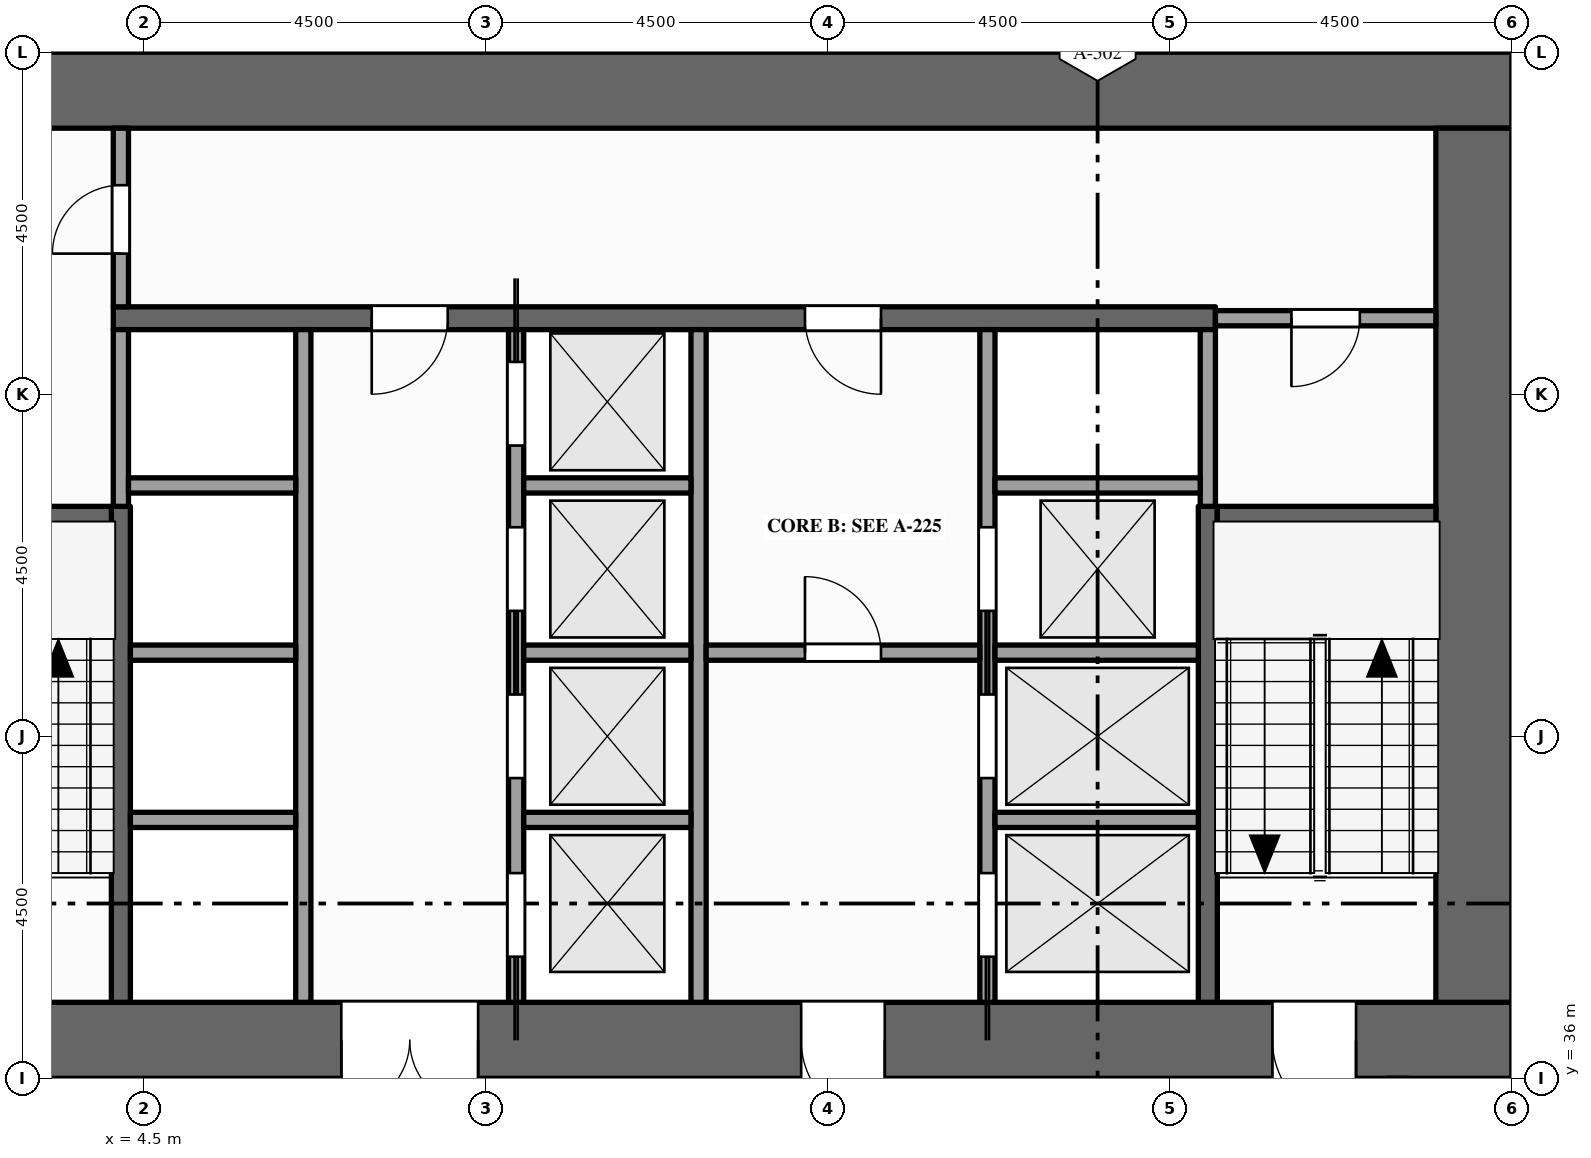
"""IFC4 building model, lengths in metres.
Left out: names, types, materials, properties, quantities, classifications, styles, units other than length and angle.
Written with IfcOpenShell. Run it as: python <this file> out.ifc"""

import sys

from ifc_helpers import new_model, si_unit, direction, frame, frame_2d, origin, place, context, subcontext, project, spatial, rectangle, extrude, element, fill, save


model = new_model("IFC4")
c1 = context("Model", 3, precision=1e-05, world=origin(), true_north=direction((0.0, 1.0)))
c2 = subcontext(c1, "Body", "Model", "MODEL_VIEW")
j1 = project(units=[si_unit("LENGTHUNIT", "METRE"), si_unit("PLANEANGLEUNIT", "RADIAN")], contexts=[c1])
p1 = place(None, origin())
s1 = spatial("IfcSite", under=j1, at=p1, CompositionType="ELEMENT")
p2 = place(p1, origin())
s2 = spatial("IfcBuilding", under=s1, at=p2, CompositionType="ELEMENT")
p3 = place(p2, frame((0.0, 0.0, 139.0)))
s3 = spatial("IfcBuildingStorey", under=s2, at=p3, CompositionType="ELEMENT", Elevation=139.0)
p4 = place(p3, frame((0.0, 36.5, -0.15), z_axis=(0.0, 0.0, 1.0), x_axis=(1.0, 0.0, 0.0)))
e1 = element("IfcWall", 1, at=p4, inside=s3, PredefinedType="SHEAR", context=c2, shape_type="SweptSolid", body=[
    extrude(rectangle(XDim=22.5, YDim=1.0, at=frame_2d((11.25, 0.0))), origin(), (0.0, 0.0, 1.0), 4.0),
])
p5 = place(p4, frame((7.1, 0.0, 0.15)))
e2 = element("IfcOpeningElement", 2, at=p5, cuts=e1, PredefinedType="OPENING", context=c2, shape_type="SweptSolid", body=[
    extrude(rectangle(XDim=1.8, YDim=2.1, at=frame_2d((0.9, 1.05))), frame((0.0, 0.51, 0.0), z_axis=(0.0, -1.0, 0.0), x_axis=(1.0, 0.0, 0.0)), (0.0, 0.0, 1.0), 1.02),
])
p6 = place(p4, frame((13.15, 0.0, 0.15)))
e3 = element("IfcOpeningElement", 3, at=p6, cuts=e1, PredefinedType="OPENING", context=c2, shape_type="SweptSolid", body=[
    extrude(rectangle(XDim=1.1, YDim=2.1, at=frame_2d((0.55, 1.05))), frame((0.0, 0.51, 0.0), z_axis=(0.0, -1.0, 0.0), x_axis=(1.0, 0.0, 0.0)), (0.0, 0.0, 1.0), 1.02),
])
p7 = place(p4, frame((2.15, 0.0, 0.15)))
e4 = element("IfcOpeningElement", 4, at=p7, cuts=e1, PredefinedType="OPENING", context=c2, shape_type="SweptSolid", body=[
    extrude(rectangle(XDim=1.1, YDim=2.1, at=frame_2d((0.55, 1.05))), frame((0.0, 0.51, 0.0), z_axis=(0.0, -1.0, 0.0), x_axis=(1.0, 0.0, 0.0)), (0.0, 0.0, 1.0), 1.02),
])
p8 = place(p4, frame((19.35, 0.0, 0.15)))
e5 = element("IfcOpeningElement", 5, at=p8, cuts=e1, PredefinedType="OPENING", context=c2, shape_type="SweptSolid", body=[
    extrude(rectangle(XDim=1.1, YDim=2.1, at=frame_2d((0.55, 1.05))), frame((0.0, 0.51, 0.0), z_axis=(0.0, -1.0, 0.0), x_axis=(1.0, 0.0, 0.0)), (0.0, 0.0, 1.0), 1.02),
])
p9 = place(p3, frame((0.0, 49.0, -0.15), z_axis=(0.0, 0.0, 1.0), x_axis=(1.0, 0.0, 0.0)))
e6 = element("IfcWall", 6, at=p9, inside=s3, PredefinedType="SHEAR", context=c2, shape_type="SweptSolid", body=[
    extrude(rectangle(XDim=22.5, YDim=1.0, at=frame_2d((11.25, 0.0))), origin(), (0.0, 0.0, 1.0), 4.0),
])
p10 = place(p3, frame((22.0, 37.0, -0.15), z_axis=(0.0, 0.0, 1.0), x_axis=(0.0, 1.0, 0.0)))
e7 = element("IfcWall", 7, at=p10, inside=s3, PredefinedType="SHEAR", context=c2, shape_type="SweptSolid", body=[
    extrude(rectangle(XDim=11.5, YDim=1.0, at=frame_2d((5.75, 0.0))), origin(), (0.0, 0.0, 1.0), 4.0),
])
p11 = place(p3, frame((4.2, 37.0, 0.0), z_axis=(0.0, 0.0, 1.0), x_axis=(0.0, 1.0, 0.0)))
e8 = element("IfcWall", 8, at=p11, inside=s3, PredefinedType="SHEAR", context=c2, shape_type="SweptSolid", body=[
    extrude(rectangle(XDim=6.525, YDim=0.25, at=frame_2d((3.262, 0.0))), origin(), (0.0, 0.0, 1.0), 3.85),
])
p12 = place(p3, frame((4.2, 43.525, 0.0), z_axis=(0.0, 0.0, 1.0), x_axis=(0.0, 1.0, 0.0)))
e9 = element("IfcWall", 9, at=p12, inside=s3, PredefinedType="SOLIDWALL", context=c2, shape_type="SweptSolid", body=[
    extrude(rectangle(XDim=2.325, YDim=0.2, at=frame_2d((1.163, 0.0))), origin(), (0.0, 0.0, 1.0), 3.85),
])
p13 = place(p3, frame((4.2, 46.15, 0.0), z_axis=(0.0, 0.0, 1.0), x_axis=(0.0, 1.0, 0.0)))
e10 = element("IfcWall", 10, at=p13, inside=s3, PredefinedType="PARTITIONING", context=c2, shape_type="SweptSolid", body=[
    extrude(rectangle(XDim=2.35, YDim=0.2, at=frame_2d((1.175, 0.0))), origin(), (0.0, 0.0, 1.0), 3.85),
])
p14 = place(p13, frame((0.7, 0.0, 0.0)))
e11 = element("IfcOpeningElement", 11, at=p14, cuts=e10, PredefinedType="OPENING", context=c2, shape_type="SweptSolid", body=[
    extrude(rectangle(XDim=0.9, YDim=2.1, at=frame_2d((0.45, 1.05))), frame((0.0, 0.11, 0.0), z_axis=(0.0, -1.0, 0.0), x_axis=(1.0, 0.0, 0.0)), (0.0, 0.0, 1.0), 0.22),
])
p15 = place(p3, frame((6.6, 37.0, 0.0), z_axis=(0.0, 0.0, 1.0), x_axis=(0.0, 1.0, 0.0)))
e12 = element("IfcWall", 12, at=p15, inside=s3, PredefinedType="SOLIDWALL", context=c2, shape_type="SweptSolid", body=[
    extrude(rectangle(XDim=8.85, YDim=0.2, at=frame_2d((4.425, 0.0))), origin(), (0.0, 0.0, 1.0), 3.85),
])
p16 = place(p3, frame((9.4, 37.0, 0.0), z_axis=(0.0, 0.0, 1.0), x_axis=(0.0, 1.0, 0.0)))
e13 = element("IfcWall", 13, at=p16, inside=s3, PredefinedType="SOLIDWALL", context=c2, shape_type="SweptSolid", body=[
    extrude(rectangle(XDim=8.85, YDim=0.2, at=frame_2d((4.425, 0.0))), origin(), (0.0, 0.0, 1.0), 3.85),
])
p17 = place(p16, frame((0.6, 0.0, 0.012)))
e14 = element("IfcOpeningElement", 14, at=p17, cuts=e13, PredefinedType="OPENING", context=c2, shape_type="SweptSolid", body=[
    extrude(rectangle(XDim=1.1, YDim=2.1, at=frame_2d((0.55, 1.05))), frame((0.0, 0.11, 0.0), z_axis=(0.0, -1.0, 0.0), x_axis=(1.0, 0.0, 0.0)), (0.0, 0.0, 1.0), 0.22),
])
p18 = place(p16, frame((2.95, 0.0, 0.012)))
e15 = element("IfcOpeningElement", 15, at=p18, cuts=e13, PredefinedType="OPENING", context=c2, shape_type="SweptSolid", body=[
    extrude(rectangle(XDim=1.1, YDim=2.1, at=frame_2d((0.55, 1.05))), frame((0.0, 0.11, 0.0), z_axis=(0.0, -1.0, 0.0), x_axis=(1.0, 0.0, 0.0)), (0.0, 0.0, 1.0), 0.22),
])
p19 = place(p16, frame((5.15, 0.0, 0.012)))
e16 = element("IfcOpeningElement", 16, at=p19, cuts=e13, PredefinedType="OPENING", context=c2, shape_type="SweptSolid", body=[
    extrude(rectangle(XDim=1.1, YDim=2.1, at=frame_2d((0.55, 1.05))), frame((0.0, 0.11, 0.0), z_axis=(0.0, -1.0, 0.0), x_axis=(1.0, 0.0, 0.0)), (0.0, 0.0, 1.0), 0.22),
])
p20 = place(p16, frame((7.325, 0.0, 0.012)))
e17 = element("IfcOpeningElement", 17, at=p20, cuts=e13, PredefinedType="OPENING", context=c2, shape_type="SweptSolid", body=[
    extrude(rectangle(XDim=1.1, YDim=2.1, at=frame_2d((0.55, 1.05))), frame((0.0, 0.11, 0.0), z_axis=(0.0, -1.0, 0.0), x_axis=(1.0, 0.0, 0.0)), (0.0, 0.0, 1.0), 0.22),
])
p21 = place(p3, frame((11.8, 37.0, 0.0), z_axis=(0.0, 0.0, 1.0), x_axis=(0.0, 1.0, 0.0)))
e18 = element("IfcWall", 18, at=p21, inside=s3, PredefinedType="SOLIDWALL", context=c2, shape_type="SweptSolid", body=[
    extrude(rectangle(XDim=8.85, YDim=0.2, at=frame_2d((4.425, 0.0))), origin(), (0.0, 0.0, 1.0), 3.85),
])
p22 = place(p3, frame((15.6, 37.0, 0.0), z_axis=(0.0, 0.0, 1.0), x_axis=(0.0, 1.0, 0.0)))
e19 = element("IfcWall", 19, at=p22, inside=s3, PredefinedType="SOLIDWALL", context=c2, shape_type="SweptSolid", body=[
    extrude(rectangle(XDim=8.85, YDim=0.2, at=frame_2d((4.425, 0.0))), origin(), (0.0, 0.0, 1.0), 3.85),
])
p23 = place(p22, frame((0.6, 0.0, 0.012)))
e20 = element("IfcOpeningElement", 20, at=p23, cuts=e19, PredefinedType="OPENING", context=c2, shape_type="SweptSolid", body=[
    extrude(rectangle(XDim=1.1, YDim=2.1, at=frame_2d((0.55, 1.05))), frame((0.0, 0.11, 0.0), z_axis=(0.0, -1.0, 0.0), x_axis=(1.0, 0.0, 0.0)), (0.0, 0.0, 1.0), 0.22),
])
p24 = place(p22, frame((2.95, 0.0, 0.012)))
e21 = element("IfcOpeningElement", 21, at=p24, cuts=e19, PredefinedType="OPENING", context=c2, shape_type="SweptSolid", body=[
    extrude(rectangle(XDim=1.1, YDim=2.1, at=frame_2d((0.55, 1.05))), frame((0.0, 0.11, 0.0), z_axis=(0.0, -1.0, 0.0), x_axis=(1.0, 0.0, 0.0)), (0.0, 0.0, 1.0), 0.22),
])
p25 = place(p22, frame((5.15, 0.0, 0.012)))
e22 = element("IfcOpeningElement", 22, at=p25, cuts=e19, PredefinedType="OPENING", context=c2, shape_type="SweptSolid", body=[
    extrude(rectangle(XDim=1.1, YDim=2.1, at=frame_2d((0.55, 1.05))), frame((0.0, 0.11, 0.0), z_axis=(0.0, -1.0, 0.0), x_axis=(1.0, 0.0, 0.0)), (0.0, 0.0, 1.0), 0.22),
])
p26 = place(p3, frame((18.5, 37.0, 0.0), z_axis=(0.0, 0.0, 1.0), x_axis=(0.0, 1.0, 0.0)))
e23 = element("IfcWall", 23, at=p26, inside=s3, PredefinedType="SHEAR", context=c2, shape_type="SweptSolid", body=[
    extrude(rectangle(XDim=6.525, YDim=0.25, at=frame_2d((3.262, 0.0))), origin(), (0.0, 0.0, 1.0), 3.85),
])
p27 = place(p3, frame((18.5, 43.525, 0.0), z_axis=(0.0, 0.0, 1.0), x_axis=(0.0, 1.0, 0.0)))
e24 = element("IfcWall", 24, at=p27, inside=s3, PredefinedType="SOLIDWALL", context=c2, shape_type="SweptSolid", body=[
    extrude(rectangle(XDim=2.325, YDim=0.2, at=frame_2d((1.163, 0.0))), origin(), (0.0, 0.0, 1.0), 3.85),
])
p28 = place(p3, frame((4.325, 39.4, 0.0), z_axis=(0.0, 0.0, 1.0), x_axis=(1.0, 0.0, 0.0)))
e25 = element("IfcWall", 25, at=p28, inside=s3, PredefinedType="SOLIDWALL", context=c2, shape_type="SweptSolid", body=[
    extrude(rectangle(XDim=2.175, YDim=0.2, at=frame_2d((1.087, 0.0))), origin(), (0.0, 0.0, 1.0), 3.85),
])
p29 = place(p3, frame((9.5, 39.4, 0.0), z_axis=(0.0, 0.0, 1.0), x_axis=(1.0, 0.0, 0.0)))
e26 = element("IfcWall", 26, at=p29, inside=s3, PredefinedType="SOLIDWALL", context=c2, shape_type="SweptSolid", body=[
    extrude(rectangle(XDim=2.2, YDim=0.2, at=frame_2d((1.1, 0.0))), origin(), (0.0, 0.0, 1.0), 3.85),
])
p30 = place(p3, frame((15.7, 39.4, 0.0), z_axis=(0.0, 0.0, 1.0), x_axis=(1.0, 0.0, 0.0)))
e27 = element("IfcWall", 27, at=p30, inside=s3, PredefinedType="SOLIDWALL", context=c2, shape_type="SweptSolid", body=[
    extrude(rectangle(XDim=2.675, YDim=0.2, at=frame_2d((1.337, 0.0))), origin(), (0.0, 0.0, 1.0), 3.85),
])
p31 = place(p3, frame((4.325, 41.6, 0.0), z_axis=(0.0, 0.0, 1.0), x_axis=(1.0, 0.0, 0.0)))
e28 = element("IfcWall", 28, at=p31, inside=s3, PredefinedType="SOLIDWALL", context=c2, shape_type="SweptSolid", body=[
    extrude(rectangle(XDim=2.175, YDim=0.2, at=frame_2d((1.087, 0.0))), origin(), (0.0, 0.0, 1.0), 3.85),
])
p32 = place(p3, frame((9.5, 41.6, 0.0), z_axis=(0.0, 0.0, 1.0), x_axis=(1.0, 0.0, 0.0)))
e29 = element("IfcWall", 29, at=p32, inside=s3, PredefinedType="SOLIDWALL", context=c2, shape_type="SweptSolid", body=[
    extrude(rectangle(XDim=2.2, YDim=0.2, at=frame_2d((1.1, 0.0))), origin(), (0.0, 0.0, 1.0), 3.85),
])
p33 = place(p3, frame((11.9, 41.6, 0.0), z_axis=(0.0, 0.0, 1.0), x_axis=(1.0, 0.0, 0.0)))
e30 = element("IfcWall", 30, at=p33, inside=s3, PredefinedType="PARTITIONING", context=c2, shape_type="SweptSolid", body=[
    extrude(rectangle(XDim=3.6, YDim=0.2, at=frame_2d((1.8, 0.0))), origin(), (0.0, 0.0, 1.0), 3.85),
])
p34 = place(p33, frame((1.3, 0.0, 0.0)))
e31 = element("IfcOpeningElement", 31, at=p34, cuts=e30, PredefinedType="OPENING", context=c2, shape_type="SweptSolid", body=[
    extrude(rectangle(XDim=1.0, YDim=2.1, at=frame_2d((0.5, 1.05))), frame((0.0, 0.11, 0.0), z_axis=(0.0, -1.0, 0.0), x_axis=(1.0, 0.0, 0.0)), (0.0, 0.0, 1.0), 0.22),
])
p35 = place(p3, frame((15.7, 41.6, 0.0), z_axis=(0.0, 0.0, 1.0), x_axis=(1.0, 0.0, 0.0)))
e32 = element("IfcWall", 32, at=p35, inside=s3, PredefinedType="SOLIDWALL", context=c2, shape_type="SweptSolid", body=[
    extrude(rectangle(XDim=2.675, YDim=0.2, at=frame_2d((1.337, 0.0))), origin(), (0.0, 0.0, 1.0), 3.85),
])
p36 = place(p3, frame((1.0, 43.4, 0.0), z_axis=(0.0, 0.0, 1.0), x_axis=(1.0, 0.0, 0.0)))
e33 = element("IfcWall", 33, at=p36, inside=s3, PredefinedType="SHEAR", context=c2, shape_type="SweptSolid", body=[
    extrude(rectangle(XDim=3.075, YDim=0.25, at=frame_2d((1.538, 0.0))), origin(), (0.0, 0.0, 1.0), 3.85),
])
p37 = place(p3, frame((18.625, 43.4, 0.0), z_axis=(0.0, 0.0, 1.0), x_axis=(1.0, 0.0, 0.0)))
e34 = element("IfcWall", 34, at=p37, inside=s3, PredefinedType="SHEAR", context=c2, shape_type="SweptSolid", body=[
    extrude(rectangle(XDim=2.875, YDim=0.25, at=frame_2d((1.438, 0.0))), origin(), (0.0, 0.0, 1.0), 3.85),
])
for number, where, z_axis, x_axis in (
    (35, (4.3, 43.8, 0.0), (0.0, 0.0, 1.0), (1.0, 0.0, 0.0)),
    (36, (9.5, 43.8, 0.0), (0.0, 0.0, 1.0), (1.0, 0.0, 0.0)),
):
    element("IfcWall", number, at=place(p3, frame(where, z_axis=z_axis, x_axis=x_axis)), inside=s3, PredefinedType="SOLIDWALL", context=c2, shape_type="SweptSolid", body=[
        extrude(rectangle(XDim=2.2, YDim=0.2, at=frame_2d((1.1, 0.0))), origin(), (0.0, 0.0, 1.0), 3.85),
    ])
p38 = place(p3, frame((15.7, 43.8, 0.0), z_axis=(0.0, 0.0, 1.0), x_axis=(1.0, 0.0, 0.0)))
e37 = element("IfcWall", 37, at=p38, inside=s3, PredefinedType="SOLIDWALL", context=c2, shape_type="SweptSolid", body=[
    extrude(rectangle(XDim=2.7, YDim=0.2, at=frame_2d((1.35, 0.0))), origin(), (0.0, 0.0, 1.0), 3.85),
])
p39 = place(p3, frame((4.1, 46.0, 0.0), z_axis=(0.0, 0.0, 1.0), x_axis=(1.0, 0.0, 0.0)))
e38 = element("IfcWall", 38, at=p39, inside=s3, PredefinedType="SHEAR", context=c2, shape_type="SweptSolid", body=[
    extrude(rectangle(XDim=14.5, YDim=0.3, at=frame_2d((7.25, 0.0))), origin(), (0.0, 0.0, 1.0), 3.85),
])
p40 = place(p39, frame((3.4, 0.0, 0.0)))
e39 = element("IfcOpeningElement", 39, at=p40, cuts=e38, PredefinedType="OPENING", context=c2, shape_type="SweptSolid", body=[
    extrude(rectangle(XDim=1.0, YDim=2.1, at=frame_2d((0.5, 1.05))), frame((0.0, 0.16, 0.0), z_axis=(0.0, -1.0, 0.0), x_axis=(1.0, 0.0, 0.0)), (0.0, 0.0, 1.0), 0.32),
])
p41 = place(p39, frame((9.1, 0.0, 0.0)))
e40 = element("IfcOpeningElement", 40, at=p41, cuts=e38, PredefinedType="OPENING", context=c2, shape_type="SweptSolid", body=[
    extrude(rectangle(XDim=1.0, YDim=2.1, at=frame_2d((0.5, 1.05))), frame((0.0, 0.16, 0.0), z_axis=(0.0, -1.0, 0.0), x_axis=(1.0, 0.0, 0.0)), (0.0, 0.0, 1.0), 0.32),
])
p42 = place(p3, frame((18.6, 46.0, 0.0), z_axis=(0.0, 0.0, 1.0), x_axis=(1.0, 0.0, 0.0)))
e41 = element("IfcWall", 41, at=p42, inside=s3, PredefinedType="PARTITIONING", context=c2, shape_type="SweptSolid", body=[
    extrude(rectangle(XDim=2.9, YDim=0.2, at=frame_2d((1.45, 0.0))), origin(), (0.0, 0.0, 1.0), 3.85),
])
p43 = place(p42, frame((1.0, 0.0, 0.0)))
e42 = element("IfcOpeningElement", 42, at=p43, cuts=e41, PredefinedType="OPENING", context=c2, shape_type="SweptSolid", body=[
    extrude(rectangle(XDim=0.9, YDim=2.1, at=frame_2d((0.45, 1.05))), frame((0.0, 0.11, 0.0), z_axis=(0.0, -1.0, 0.0), x_axis=(1.0, 0.0, 0.0)), (0.0, 0.0, 1.0), 0.22),
])
p44 = place(p17, origin())
e43 = element("IfcDoor", 43, at=p44, inside=s3, OperationType="SLIDING_TO_LEFT", PredefinedType="DOOR", context=c2, shape_type="SweptSolid", body=[
    extrude(rectangle(XDim=1.1, YDim=2.1, at=frame_2d((0.55, 1.05))), frame((0.0, 0.025, 0.0), z_axis=(0.0, -1.0, 0.0), x_axis=(1.0, 0.0, 0.0)), (0.0, 0.0, 1.0), 0.05),
])
fill(e14, e43)
p45 = place(p18, origin())
e44 = element("IfcDoor", 44, at=p45, inside=s3, OperationType="SLIDING_TO_RIGHT", PredefinedType="DOOR", context=c2, shape_type="SweptSolid", body=[
    extrude(rectangle(XDim=1.1, YDim=2.1, at=frame_2d((0.55, 1.05))), frame((0.0, 0.025, 0.0), z_axis=(0.0, -1.0, 0.0), x_axis=(1.0, 0.0, 0.0)), (0.0, 0.0, 1.0), 0.05),
])
fill(e15, e44)
p46 = place(p19, origin())
e45 = element("IfcDoor", 45, at=p46, inside=s3, OperationType="SLIDING_TO_LEFT", PredefinedType="DOOR", context=c2, shape_type="SweptSolid", body=[
    extrude(rectangle(XDim=1.1, YDim=2.1, at=frame_2d((0.55, 1.05))), frame((0.0, 0.025, 0.0), z_axis=(0.0, -1.0, 0.0), x_axis=(1.0, 0.0, 0.0)), (0.0, 0.0, 1.0), 0.05),
])
fill(e16, e45)
p47 = place(p20, origin())
e46 = element("IfcDoor", 46, at=p47, inside=s3, OperationType="SLIDING_TO_RIGHT", PredefinedType="DOOR", context=c2, shape_type="SweptSolid", body=[
    extrude(rectangle(XDim=1.1, YDim=2.1, at=frame_2d((0.55, 1.05))), frame((0.0, 0.025, 0.0), z_axis=(0.0, -1.0, 0.0), x_axis=(1.0, 0.0, 0.0)), (0.0, 0.0, 1.0), 0.05),
])
fill(e17, e46)
p48 = place(p23, origin())
e47 = element("IfcDoor", 47, at=p48, inside=s3, OperationType="SLIDING_TO_LEFT", PredefinedType="DOOR", context=c2, shape_type="SweptSolid", body=[
    extrude(rectangle(XDim=1.1, YDim=2.1, at=frame_2d((0.55, 1.05))), frame((0.0, 0.025, 0.0), z_axis=(0.0, -1.0, 0.0), x_axis=(1.0, 0.0, 0.0)), (0.0, 0.0, 1.0), 0.05),
])
fill(e20, e47)
p49 = place(p24, origin())
e48 = element("IfcDoor", 48, at=p49, inside=s3, OperationType="SLIDING_TO_RIGHT", PredefinedType="DOOR", context=c2, shape_type="SweptSolid", body=[
    extrude(rectangle(XDim=1.1, YDim=2.1, at=frame_2d((0.55, 1.05))), frame((0.0, 0.025, 0.0), z_axis=(0.0, -1.0, 0.0), x_axis=(1.0, 0.0, 0.0)), (0.0, 0.0, 1.0), 0.05),
])
fill(e21, e48)
p50 = place(p25, origin())
e49 = element("IfcDoor", 49, at=p50, inside=s3, OperationType="SLIDING_TO_LEFT", PredefinedType="DOOR", context=c2, shape_type="SweptSolid", body=[
    extrude(rectangle(XDim=1.1, YDim=2.1, at=frame_2d((0.55, 1.05))), frame((0.0, 0.025, 0.0), z_axis=(0.0, -1.0, 0.0), x_axis=(1.0, 0.0, 0.0)), (0.0, 0.0, 1.0), 0.05),
])
fill(e22, e49)
p51 = place(p5, origin())
e50 = element("IfcDoor", 50, at=p51, inside=s3, OperationType="DOUBLE_DOOR_SINGLE_SWING", PredefinedType="DOOR", context=c2, shape_type="SweptSolid", body=[
    extrude(rectangle(XDim=1.8, YDim=2.1, at=frame_2d((0.9, 1.05))), frame((0.0, 0.025, 0.0), z_axis=(0.0, -1.0, 0.0), x_axis=(1.0, 0.0, 0.0)), (0.0, 0.0, 1.0), 0.05),
])
fill(e2, e50)
p52 = place(p40, origin())
e51 = element("IfcDoor", 51, at=p52, inside=s3, OperationType="SINGLE_SWING_LEFT", PredefinedType="DOOR", context=c2, shape_type="SweptSolid", body=[
    extrude(rectangle(XDim=1.0, YDim=2.1, at=frame_2d((0.5, 1.05))), frame((0.0, 0.025, 0.0), z_axis=(0.0, -1.0, 0.0), x_axis=(1.0, 0.0, 0.0)), (0.0, 0.0, 1.0), 0.05),
])
fill(e39, e51)
p53 = place(p6, origin())
e52 = element("IfcDoor", 52, at=p53, inside=s3, OperationType="SINGLE_SWING_RIGHT", PredefinedType="DOOR", context=c2, shape_type="SweptSolid", body=[
    extrude(rectangle(XDim=1.1, YDim=2.1, at=frame_2d((0.55, 1.05))), frame((0.0, 0.025, 0.0), z_axis=(0.0, -1.0, 0.0), x_axis=(1.0, 0.0, 0.0)), (0.0, 0.0, 1.0), 0.05),
])
fill(e3, e52)
p54 = place(p34, origin())
e53 = element("IfcDoor", 53, at=p54, inside=s3, OperationType="SINGLE_SWING_LEFT", PredefinedType="DOOR", context=c2, shape_type="SweptSolid", body=[
    extrude(rectangle(XDim=1.0, YDim=2.1, at=frame_2d((0.5, 1.05))), frame((0.0, 0.025, 0.0), z_axis=(0.0, -1.0, 0.0), x_axis=(1.0, 0.0, 0.0)), (0.0, 0.0, 1.0), 0.05),
])
fill(e31, e53)
p55 = place(p41, origin())
e54 = element("IfcDoor", 54, at=p55, inside=s3, OperationType="SINGLE_SWING_RIGHT", PredefinedType="DOOR", context=c2, shape_type="SweptSolid", body=[
    extrude(rectangle(XDim=1.0, YDim=2.1, at=frame_2d((0.5, 1.05))), frame((0.0, 0.025, 0.0), z_axis=(0.0, -1.0, 0.0), x_axis=(1.0, 0.0, 0.0)), (0.0, 0.0, 1.0), 0.05),
])
fill(e40, e54)
p56 = place(p8, origin())
e55 = element("IfcDoor", 55, at=p56, inside=s3, OperationType="SINGLE_SWING_RIGHT", PredefinedType="DOOR", context=c2, shape_type="SweptSolid", body=[
    extrude(rectangle(XDim=1.1, YDim=2.1, at=frame_2d((0.55, 1.05))), frame((0.0, 0.025, 0.0), z_axis=(0.0, -1.0, 0.0), x_axis=(1.0, 0.0, 0.0)), (0.0, 0.0, 1.0), 0.05),
])
fill(e5, e55)
p57 = place(p14, origin())
e56 = element("IfcDoor", 56, at=p57, inside=s3, OperationType="SINGLE_SWING_LEFT", PredefinedType="DOOR", context=c2, shape_type="SweptSolid", body=[
    extrude(rectangle(XDim=0.9, YDim=2.1, at=frame_2d((0.45, 1.05))), frame((0.0, 0.025, 0.0), z_axis=(0.0, -1.0, 0.0), x_axis=(1.0, 0.0, 0.0)), (0.0, 0.0, 1.0), 0.05),
])
fill(e11, e56)
p58 = place(p43, origin())
e57 = element("IfcDoor", 57, at=p58, inside=s3, OperationType="SINGLE_SWING_LEFT", PredefinedType="DOOR", context=c2, shape_type="SweptSolid", body=[
    extrude(rectangle(XDim=0.9, YDim=2.1, at=frame_2d((0.45, 1.05))), frame((0.0, 0.025, 0.0), z_axis=(0.0, -1.0, 0.0), x_axis=(1.0, 0.0, 0.0)), (0.0, 0.0, 1.0), 0.05),
])
fill(e42, e57)
save(model, sys.argv[1])
